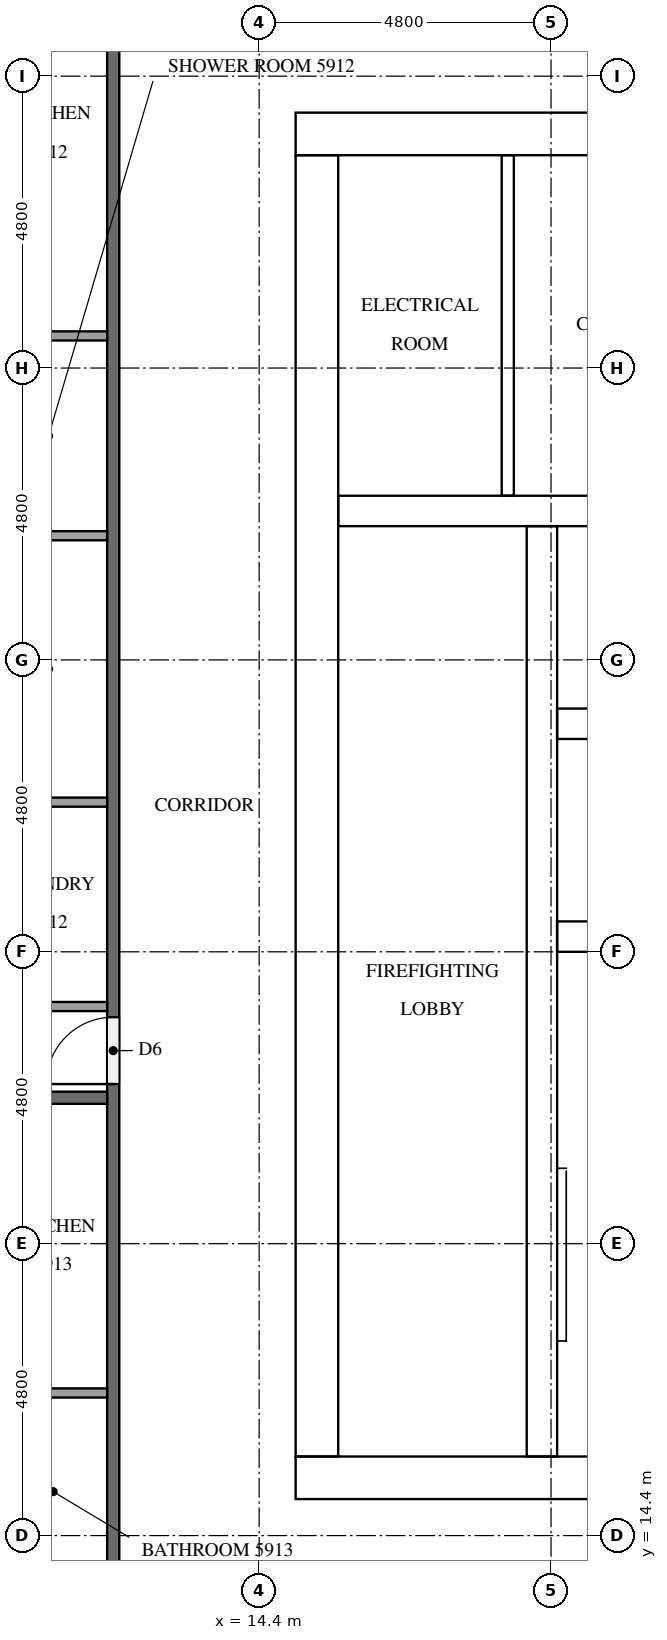
"""IFC4 building model, lengths in metres.
Left out: names, types, materials, properties, quantities, classifications, styles, units other than length and angle.
Written with IfcOpenShell. Run it as: python <this file> out.ifc"""

import sys

from ifc_helpers import new_model, si_unit, direction, frame, frame_2d, origin, place, context, subcontext, project, spatial, rectangle, extrude, element, fill, save


model = new_model("IFC4")
c1 = context("Model", 3, precision=1e-05, world=origin(), true_north=direction((0.0, 1.0)))
c2 = subcontext(c1, "Body", "Model", "MODEL_VIEW")
j1 = project(units=[si_unit("LENGTHUNIT", "METRE"), si_unit("PLANEANGLEUNIT", "RADIAN")], contexts=[c1])
p1 = place(None, origin())
s1 = spatial("IfcSite", under=j1, at=p1, CompositionType="ELEMENT")
p2 = place(p1, origin())
s2 = spatial("IfcBuilding", under=s1, at=p2, CompositionType="ELEMENT")
p3 = place(p2, frame((0.0, 0.0, 226.3)))
s3 = spatial("IfcBuildingStorey", under=s2, at=p3, CompositionType="ELEMENT", Elevation=226.3)
p4 = place(p3, frame((15.0, 15.35, 0.0), z_axis=(0.0, 0.0, 1.0), x_axis=(1.0, 0.0, 0.0)))
e1 = element("IfcWall", 1, at=p4, inside=s3, PredefinedType="SHEAR", context=c2, shape_type="SweptSolid", body=[
    extrude(rectangle(XDim=32.4, YDim=0.7, at=frame_2d((16.2, 0.0))), origin(), (0.0, 0.0, 1.0), 3.2),
])
p5 = place(p4, frame((15.3, 0.0, 0.0)))
e2 = element("IfcOpeningElement", 2, at=p5, cuts=e1, PredefinedType="OPENING", context=c2, shape_type="SweptSolid", body=[
    extrude(rectangle(XDim=1.8, YDim=2.1, at=frame_2d((0.9, 1.05))), frame((0.0, 0.36, 0.0), z_axis=(0.0, -1.0, 0.0), x_axis=(1.0, 0.0, 0.0)), (0.0, 0.0, 1.0), 0.72),
])
p6 = place(p3, frame((15.0, 37.45, 0.0), z_axis=(0.0, 0.0, 1.0), x_axis=(1.0, 0.0, 0.0)))
e3 = element("IfcWall", 3, at=p6, inside=s3, PredefinedType="SHEAR", context=c2, shape_type="SweptSolid", body=[
    extrude(rectangle(XDim=32.4, YDim=0.7, at=frame_2d((16.2, 0.0))), origin(), (0.0, 0.0, 1.0), 3.2),
])
p7 = place(p6, frame((15.3, 0.0, 0.0)))
e4 = element("IfcOpeningElement", 4, at=p7, cuts=e3, PredefinedType="OPENING", context=c2, shape_type="SweptSolid", body=[
    extrude(rectangle(XDim=1.8, YDim=2.1, at=frame_2d((0.9, 1.05))), frame((0.0, 0.36, 0.0), z_axis=(0.0, -1.0, 0.0), x_axis=(1.0, 0.0, 0.0)), (0.0, 0.0, 1.0), 0.72),
])
p8 = place(p6, frame((1.544, 0.0, 0.0)))
e5 = element("IfcOpeningElement", 5, at=p8, cuts=e3, PredefinedType="OPENING", context=c2, shape_type="SweptSolid", body=[
    extrude(rectangle(XDim=1.0, YDim=2.1, at=frame_2d((0.5, 1.05))), frame((0.0, 0.36, 0.0), z_axis=(0.0, -1.0, 0.0), x_axis=(1.0, 0.0, 0.0)), (0.0, 0.0, 1.0), 0.72),
])
p9 = place(p6, frame((5.219, 0.0, 0.0)))
e6 = element("IfcOpeningElement", 6, at=p9, cuts=e3, PredefinedType="OPENING", context=c2, shape_type="SweptSolid", body=[
    extrude(rectangle(XDim=1.0, YDim=2.1, at=frame_2d((0.5, 1.05))), frame((0.0, 0.36, 0.0), z_axis=(0.0, -1.0, 0.0), x_axis=(1.0, 0.0, 0.0)), (0.0, 0.0, 1.0), 0.72),
])
p10 = place(p3, frame((15.35, 15.7, 0.0), z_axis=(0.0, 0.0, 1.0), x_axis=(0.0, 1.0, 0.0)))
e7 = element("IfcWall", 7, at=p10, inside=s3, PredefinedType="SHEAR", context=c2, shape_type="SweptSolid", body=[
    extrude(rectangle(XDim=21.4, YDim=0.7, at=frame_2d((10.7, 0.0))), origin(), (0.0, 0.0, 1.0), 3.2),
])
p11 = place(p10, frame((5.06, 0.0, 0.0)))
e8 = element("IfcOpeningElement", 8, at=p11, cuts=e7, PredefinedType="OPENING", context=c2, shape_type="SweptSolid", body=[
    extrude(rectangle(XDim=1.2, YDim=2.1, at=frame_2d((0.6, 1.05))), frame((0.0, 0.36, 0.0), z_axis=(0.0, -1.0, 0.0), x_axis=(1.0, 0.0, 0.0)), (0.0, 0.0, 1.0), 0.72),
])
p12 = place(p3, frame((19.05, 15.7, 0.0), z_axis=(0.0, 0.0, 1.0), x_axis=(0.0, 1.0, 0.0)))
e9 = element("IfcWall", 9, at=p12, inside=s3, PredefinedType="SHEAR", context=c2, shape_type="SweptSolid", body=[
    extrude(rectangle(XDim=15.3, YDim=0.5, at=frame_2d((7.65, 0.0))), origin(), (0.0, 0.0, 1.0), 3.2),
])
p13 = place(p12, frame((9.75, 0.0, 0.0)))
e10 = element("IfcOpeningElement", 10, at=p13, cuts=e9, PredefinedType="OPENING", context=c2, shape_type="SweptSolid", body=[
    extrude(rectangle(XDim=1.1, YDim=2.1, at=frame_2d((0.55, 1.05))), frame((0.0, 0.26, 0.0), z_axis=(0.0, -1.0, 0.0), x_axis=(1.0, 0.0, 0.0)), (0.0, 0.0, 1.0), 0.52),
])
p14 = place(p12, frame((13.25, 0.0, 0.0)))
e11 = element("IfcOpeningElement", 11, at=p14, cuts=e9, PredefinedType="OPENING", context=c2, shape_type="SweptSolid", body=[
    extrude(rectangle(XDim=1.1, YDim=2.1, at=frame_2d((0.55, 1.05))), frame((0.0, 0.26, 0.0), z_axis=(0.0, -1.0, 0.0), x_axis=(1.0, 0.0, 0.0)), (0.0, 0.0, 1.0), 0.52),
])
p15 = place(p12, frame((0.5, 0.0, 0.0)))
e12 = element("IfcOpeningElement", 12, at=p15, cuts=e9, PredefinedType="OPENING", context=c2, shape_type="SweptSolid", body=[
    extrude(rectangle(XDim=1.2, YDim=2.1, at=frame_2d((0.6, 1.05))), frame((0.0, 0.26, 0.0), z_axis=(0.0, -1.0, 0.0), x_axis=(1.0, 0.0, 0.0)), (0.0, 0.0, 1.0), 0.52),
])
for number, where, z_axis, x_axis in (
    (13, (19.3, 24.25, 0.0), (0.0, 0.0, 1.0), (1.0, 0.0, 0.0)),
    (14, (19.3, 27.75, 0.0), (0.0, 0.0, 1.0), (1.0, 0.0, 0.0)),
):
    element("IfcWall", number, at=place(p3, frame(where, z_axis=z_axis, x_axis=x_axis)), inside=s3, PredefinedType="SHEAR", context=c2, shape_type="SweptSolid", body=[
        extrude(rectangle(XDim=3.55, YDim=0.5, at=frame_2d((1.775, 0.0))), origin(), (0.0, 0.0, 1.0), 3.2),
    ])
p16 = place(p3, frame((15.7, 31.25, 0.0), z_axis=(0.0, 0.0, 1.0), x_axis=(1.0, 0.0, 0.0)))
e15 = element("IfcWall", 15, at=p16, inside=s3, PredefinedType="SHEAR", context=c2, shape_type="SweptSolid", body=[
    extrude(rectangle(XDim=7.15, YDim=0.5, at=frame_2d((3.575, 0.0))), origin(), (0.0, 0.0, 1.0), 3.2),
])
p17 = place(p3, frame((18.489, 31.5, 0.0), z_axis=(0.0, 0.0, 1.0), x_axis=(0.0, 1.0, 0.0)))
e16 = element("IfcWall", 16, at=p17, inside=s3, PredefinedType="PARTITIONING", context=c2, shape_type="SweptSolid", body=[
    extrude(rectangle(XDim=5.6, YDim=0.2, at=frame_2d((2.8, 0.0))), origin(), (0.0, 0.0, 1.0), 3.2),
])
p18 = place(p3, frame((12.0, 12.1, 0.0), z_axis=(0.0, 0.0, 1.0), x_axis=(0.0, 1.0, 0.0)))
e17 = element("IfcWall", 17, at=p18, inside=s3, PredefinedType="PARTITIONING", context=c2, shape_type="SweptSolid", body=[
    extrude(rectangle(XDim=28.6, YDim=0.2, at=frame_2d((14.3, 0.0))), origin(), (0.0, 0.0, 1.0), 3.2),
])
p19 = place(p18, frame((9.725, 0.0, 0.0)))
e18 = element("IfcOpeningElement", 18, at=p19, cuts=e17, PredefinedType="OPENING", context=c2, shape_type="SweptSolid", body=[
    extrude(rectangle(XDim=1.1, YDim=2.1, at=frame_2d((0.55, 1.05))), frame((0.0, 0.11, 0.0), z_axis=(0.0, -1.0, 0.0), x_axis=(1.0, 0.0, 0.0)), (0.0, 0.0, 1.0), 0.22),
])
p20 = place(p18, frame((0.175, 0.0, 0.0)))
e19 = element("IfcOpeningElement", 19, at=p20, cuts=e17, PredefinedType="OPENING", context=c2, shape_type="SweptSolid", body=[
    extrude(rectangle(XDim=1.0, YDim=2.1, at=frame_2d((0.5, 1.05))), frame((0.0, 0.11, 0.0), z_axis=(0.0, -1.0, 0.0), x_axis=(1.0, 0.0, 0.0)), (0.0, 0.0, 1.0), 0.22),
])
p21 = place(p3, frame((4.9, 21.6, 0.0), z_axis=(0.0, 0.0, 1.0), x_axis=(1.0, 0.0, 0.0)))
e20 = element("IfcWall", 20, at=p21, inside=s3, PredefinedType="PARTITIONING", context=c2, shape_type="SweptSolid", body=[
    extrude(rectangle(XDim=7.0, YDim=0.2, at=frame_2d((3.5, 0.0))), origin(), (0.0, 0.0, 1.0), 3.2),
])
for number, where, z_axis, x_axis in (
    (21, (11.9, 26.461, 0.0), (0.0, 0.0, 1.0), (-1.0, 0.0, 0.0)),
    (22, (11.9, 30.842, 0.0), (0.0, 0.0, 1.0), (-1.0, 0.0, 0.0)),
    (23, (11.9, 34.128, 0.0), (0.0, 0.0, 1.0), (-1.0, 0.0, 0.0)),
):
    element("IfcWall", number, at=place(p3, frame(where, z_axis=z_axis, x_axis=x_axis)), inside=s3, PredefinedType="PARTITIONING", context=c2, shape_type="SweptSolid", body=[
        extrude(rectangle(XDim=1.925, YDim=0.15, at=frame_2d((0.962, 0.0))), origin(), (0.0, 0.0, 1.0), 3.2),
    ])
p22 = place(p3, frame((11.9, 23.1, 0.0), z_axis=(0.0, 0.0, 1.0), x_axis=(-1.0, 0.0, 0.0)))
e24 = element("IfcWall", 24, at=p22, inside=s3, PredefinedType="PARTITIONING", context=c2, shape_type="SweptSolid", body=[
    extrude(rectangle(XDim=2.075, YDim=0.15, at=frame_2d((1.038, 0.0))), origin(), (0.0, 0.0, 1.0), 3.2),
])
p23 = place(p3, frame((11.9, 16.745, 0.0), z_axis=(0.0, 0.0, 1.0), x_axis=(-1.0, 0.0, 0.0)))
e25 = element("IfcWall", 25, at=p23, inside=s3, PredefinedType="PARTITIONING", context=c2, shape_type="SweptSolid", body=[
    extrude(rectangle(XDim=1.775, YDim=0.15, at=frame_2d((0.887, 0.0))), origin(), (0.0, 0.0, 1.0), 3.2),
])
p24 = place(p13, origin())
e26 = element("IfcDoor", 26, at=p24, inside=s3, OperationType="DOUBLE_DOOR_SLIDING", PredefinedType="DOOR", context=c2, shape_type="SweptSolid", body=[
    extrude(rectangle(XDim=1.1, YDim=2.1, at=frame_2d((0.55, 1.05))), frame((0.0, 0.025, 0.0), z_axis=(0.0, -1.0, 0.0), x_axis=(1.0, 0.0, 0.0)), (0.0, 0.0, 1.0), 0.05),
])
fill(e10, e26)
p25 = place(p14, origin())
e27 = element("IfcDoor", 27, at=p25, inside=s3, OperationType="DOUBLE_DOOR_SLIDING", PredefinedType="DOOR", context=c2, shape_type="SweptSolid", body=[
    extrude(rectangle(XDim=1.1, YDim=2.1, at=frame_2d((0.55, 1.05))), frame((0.0, 0.025, 0.0), z_axis=(0.0, -1.0, 0.0), x_axis=(1.0, 0.0, 0.0)), (0.0, 0.0, 1.0), 0.05),
])
fill(e11, e27)
p26 = place(p15, frame((1.2, 0.0, 0.0), z_axis=(0.0, 0.0, 1.0), x_axis=(-1.0, 0.0, 0.0)))
e28 = element("IfcDoor", 28, at=p26, inside=s3, OperationType="SINGLE_SWING_LEFT", PredefinedType="DOOR", context=c2, shape_type="SweptSolid", body=[
    extrude(rectangle(XDim=1.2, YDim=2.1, at=frame_2d((0.6, 1.05))), frame((0.0, 0.025, 0.0), z_axis=(0.0, -1.0, 0.0), x_axis=(1.0, 0.0, 0.0)), (0.0, 0.0, 1.0), 0.05),
])
fill(e12, e28)
p27 = place(p11, frame((1.2, 0.0, 0.0), z_axis=(0.0, 0.0, 1.0), x_axis=(-1.0, 0.0, 0.0)))
e29 = element("IfcDoor", 29, at=p27, inside=s3, OperationType="SINGLE_SWING_RIGHT", PredefinedType="DOOR", context=c2, shape_type="SweptSolid", body=[
    extrude(rectangle(XDim=1.2, YDim=2.1, at=frame_2d((0.6, 1.05))), frame((0.0, 0.025, 0.0), z_axis=(0.0, -1.0, 0.0), x_axis=(1.0, 0.0, 0.0)), (0.0, 0.0, 1.0), 0.05),
])
fill(e8, e29)
p28 = place(p8, origin())
e30 = element("IfcDoor", 30, at=p28, inside=s3, OperationType="SINGLE_SWING_RIGHT", PredefinedType="DOOR", context=c2, shape_type="SweptSolid", body=[
    extrude(rectangle(XDim=1.0, YDim=2.1, at=frame_2d((0.5, 1.05))), frame((0.0, 0.025, 0.0), z_axis=(0.0, -1.0, 0.0), x_axis=(1.0, 0.0, 0.0)), (0.0, 0.0, 1.0), 0.05),
])
fill(e5, e30)
p29 = place(p19, origin())
e31 = element("IfcDoor", 31, at=p29, inside=s3, OperationType="SINGLE_SWING_LEFT", PredefinedType="DOOR", context=c2, shape_type="SweptSolid", body=[
    extrude(rectangle(XDim=1.1, YDim=2.1, at=frame_2d((0.55, 1.05))), frame((0.0, 0.025, 0.0), z_axis=(0.0, -1.0, 0.0), x_axis=(1.0, 0.0, 0.0)), (0.0, 0.0, 1.0), 0.05),
])
fill(e18, e31)
save(model, sys.argv[1])
